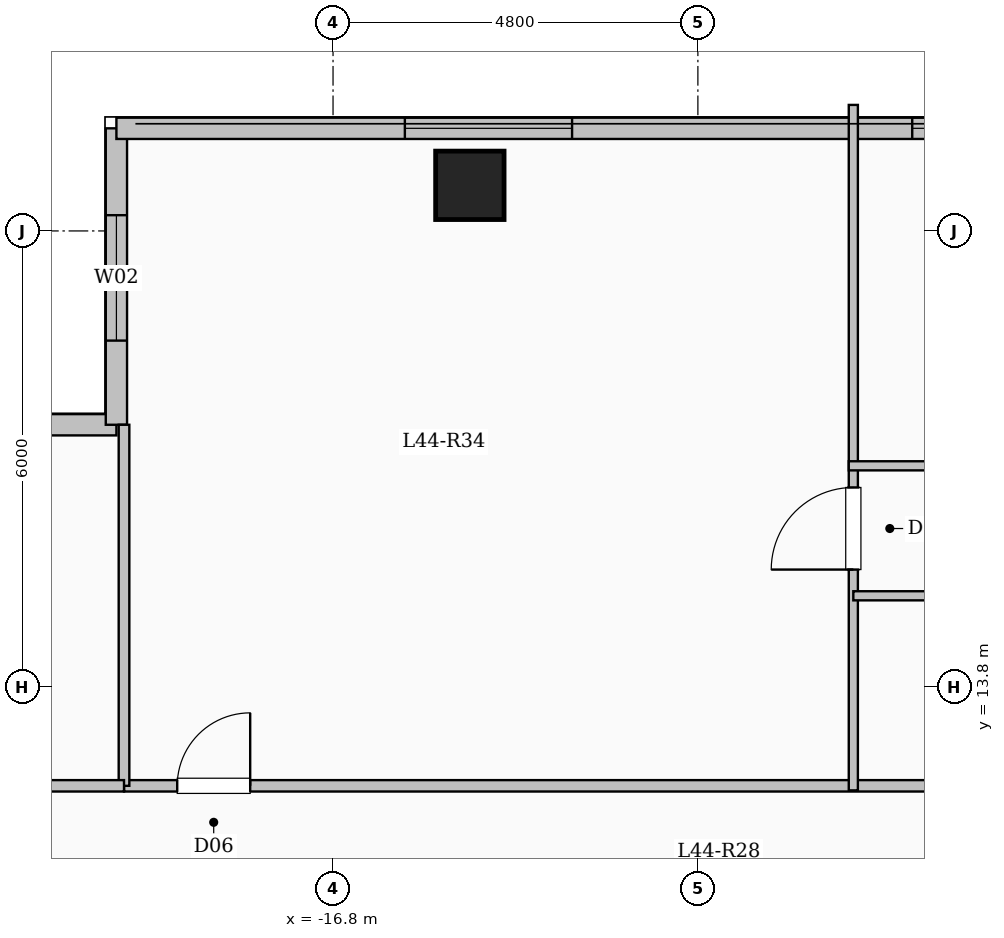
"""IFC4 building model, lengths in metres.
Left out: names, types, materials, properties, quantities, classifications, styles, units other than length and angle.
Written with IfcOpenShell. Run it as: python <this file> out.ifc"""

import sys

from ifc_helpers import new_model, si_unit, direction, frame, frame_2d, origin, origin_2d, place, context, subcontext, project, spatial, rectangle, extrude, element, fill, save


model = new_model("IFC4")
c1 = context("Model", 3, precision=1e-05, world=origin(), true_north=direction((0.0, 1.0)))
c2 = subcontext(c1, "Body", "Model", "MODEL_VIEW")
j1 = project(units=[si_unit("LENGTHUNIT", "METRE"), si_unit("PLANEANGLEUNIT", "RADIAN")], contexts=[c1])
p1 = place(None, origin())
s1 = spatial("IfcSite", under=j1, at=p1, CompositionType="ELEMENT")
p2 = place(p1, origin())
s2 = spatial("IfcBuilding", under=s1, at=p2, CompositionType="ELEMENT")
p3 = place(p2, frame((0.0, 0.0, 162.75)))
s3 = spatial("IfcBuildingStorey", under=s2, at=p3, CompositionType="ELEMENT", Elevation=162.75)
p4 = place(p3, frame((-15.0, 20.4, 0.0), z_axis=(0.0, 0.0, 1.0), x_axis=(1.0, 0.0, 0.0)))
e1 = element("IfcColumn", 1, at=p4, inside=s3, PredefinedType="COLUMN", context=c2, shape_type="SweptSolid", body=[
    extrude(rectangle(XDim=0.9, YDim=0.9, at=origin_2d()), origin(), (0.0, 0.0, 1.0), 3.35),
])
p5 = place(p3, frame((-25.05, 17.25, 0.0), z_axis=(0.0, 0.0, 1.0), x_axis=(1.0, 0.0, 0.0)))
e2 = element("IfcWall", 2, at=p5, inside=s3, PredefinedType="SOLIDWALL", context=c2, shape_type="SweptSolid", body=[
    extrude(rectangle(XDim=5.4, YDim=0.28, at=frame_2d((2.7, 0.0))), origin(), (0.0, 0.0, 1.0), 3.1),
])
p6 = place(p5, frame((1.725, 0.0, 0.9)))
e3 = element("IfcOpeningElement", 3, at=p6, cuts=e2, PredefinedType="OPENING", context=c2, shape_type="SweptSolid", body=[
    extrude(rectangle(XDim=2.0, YDim=1.7, at=frame_2d((1.0, 0.85))), frame((0.0, 0.15, 0.0), z_axis=(0.0, -1.0, 0.0), x_axis=(1.0, 0.0, 0.0)), (0.0, 0.0, 1.0), 0.3),
])
p7 = place(p3, frame((-19.65, 17.25, 0.0), z_axis=(0.0, 0.0, 1.0), x_axis=(0.0, 1.0, 0.0)))
e4 = element("IfcWall", 4, at=p7, inside=s3, PredefinedType="SOLIDWALL", context=c2, shape_type="SweptSolid", body=[
    extrude(rectangle(XDim=3.9, YDim=0.28, at=frame_2d((1.95, 0.0))), origin(), (0.0, 0.0, 1.0), 3.1),
])
p8 = place(p7, frame((1.107, 0.0, 0.9)))
e5 = element("IfcOpeningElement", 5, at=p8, cuts=e4, PredefinedType="OPENING", context=c2, shape_type="SweptSolid", body=[
    extrude(rectangle(XDim=1.65, YDim=1.6, at=frame_2d((0.825, 0.8))), frame((0.0, 0.15, 0.0), z_axis=(0.0, -1.0, 0.0), x_axis=(1.0, 0.0, 0.0)), (0.0, 0.0, 1.0), 0.3),
])
p9 = place(p3, frame((-19.65, 21.15, 0.0), z_axis=(0.0, 0.0, 1.0), x_axis=(1.0, 0.0, 0.0)))
e6 = element("IfcWall", 6, at=p9, inside=s3, PredefinedType="SOLIDWALL", context=c2, shape_type="SweptSolid", body=[
    extrude(rectangle(XDim=12.3, YDim=0.28, at=frame_2d((6.15, 0.0))), origin(), (0.0, 0.0, 1.0), 3.1),
])
p10 = place(p9, frame((3.795, 0.0, 0.9)))
e7 = element("IfcOpeningElement", 7, at=p10, cuts=e6, PredefinedType="OPENING", context=c2, shape_type="SweptSolid", body=[
    extrude(rectangle(XDim=2.2, YDim=1.75, at=frame_2d((1.1, 0.875))), frame((0.0, 0.15, 0.0), z_axis=(0.0, -1.0, 0.0), x_axis=(1.0, 0.0, 0.0)), (0.0, 0.0, 1.0), 0.3),
])
p11 = place(p9, frame((10.47, 0.0, 0.95)))
e8 = element("IfcOpeningElement", 8, at=p11, cuts=e6, PredefinedType="OPENING", context=c2, shape_type="SweptSolid", body=[
    extrude(rectangle(XDim=1.2, YDim=1.5, at=frame_2d((0.6, 0.75))), frame((0.0, 0.15, 0.0), z_axis=(0.0, -1.0, 0.0), x_axis=(1.0, 0.0, 0.0)), (0.0, 0.0, 1.0), 0.3),
])
p12 = place(p3, frame((-19.55, 12.5, 0.0), z_axis=(0.0, 0.0, 1.0), x_axis=(1.0, 0.0, 0.0)))
e9 = element("IfcWall", 9, at=p12, inside=s3, PredefinedType="PARTITIONING", context=c2, shape_type="SweptSolid", body=[
    extrude(rectangle(XDim=15.7, YDim=0.15, at=frame_2d((7.85, 0.0))), origin(), (0.0, 0.0, 1.0), 3.1),
])
p13 = place(p12, frame((0.7, 0.0, 0.0)))
e10 = element("IfcOpeningElement", 10, at=p13, cuts=e9, PredefinedType="OPENING", context=c2, shape_type="SweptSolid", body=[
    extrude(rectangle(XDim=0.96, YDim=2.15, at=frame_2d((0.48, 1.075))), frame((0.0, 0.085, 0.0), z_axis=(0.0, -1.0, 0.0), x_axis=(1.0, 0.0, 0.0)), (0.0, 0.0, 1.0), 0.17),
])
p14 = place(p3, frame((-9.955, 12.44, 0.0), z_axis=(0.0, 0.0, 1.0), x_axis=(0.0, 1.0, 0.0)))
e11 = element("IfcWall", 11, at=p14, inside=s3, PredefinedType="PARTITIONING", context=c2, shape_type="SweptSolid", body=[
    extrude(rectangle(XDim=9.018, YDim=0.12, at=frame_2d((4.509, 0.0))), origin(), (0.0, 0.0, 1.0), 3.1),
])
p15 = place(p14, frame((2.905, 0.0, 0.0)))
e12 = element("IfcOpeningElement", 12, at=p15, cuts=e11, PredefinedType="OPENING", context=c2, shape_type="SweptSolid", body=[
    extrude(rectangle(XDim=1.08, YDim=2.15, at=frame_2d((0.54, 1.075))), frame((0.0, 0.07, 0.0), z_axis=(0.0, -1.0, 0.0), x_axis=(1.0, 0.0, 0.0)), (0.0, 0.0, 1.0), 0.14),
])
p16 = place(p3, frame((-9.955, 15.0, 0.0), z_axis=(0.0, 0.0, 1.0), x_axis=(1.0, 0.0, 0.0)))
e13 = element("IfcWall", 13, at=p16, inside=s3, PredefinedType="PARTITIONING", context=c2, shape_type="SweptSolid", body=[
    extrude(rectangle(XDim=5.536, YDim=0.12, at=frame_2d((2.768, 0.0))), origin(), (0.0, 0.0, 1.0), 3.1),
])
p17 = place(p16, frame((2.328, 0.0, 0.0)))
e14 = element("IfcOpeningElement", 14, at=p17, cuts=e13, PredefinedType="OPENING", context=c2, shape_type="SweptSolid", body=[
    extrude(rectangle(XDim=0.88, YDim=2.1, at=frame_2d((0.44, 1.05))), frame((0.0, 0.07, 0.0), z_axis=(0.0, -1.0, 0.0), x_axis=(1.0, 0.0, 0.0)), (0.0, 0.0, 1.0), 0.14),
])
p18 = place(p3, frame((-10.015, 16.71, 0.0), z_axis=(0.0, 0.0, 1.0), x_axis=(1.0, 0.0, 0.0)))
e15 = element("IfcWall", 15, at=p18, inside=s3, PredefinedType="PARTITIONING", context=c2, shape_type="SweptSolid", body=[
    extrude(rectangle(XDim=10.625, YDim=0.12, at=frame_2d((5.312, 0.0))), origin(), (0.0, 0.0, 1.0), 3.1),
])
p19 = place(p18, frame((2.171, 0.0, 0.0)))
e16 = element("IfcOpeningElement", 16, at=p19, cuts=e15, PredefinedType="OPENING", context=c2, shape_type="SweptSolid", body=[
    extrude(rectangle(XDim=0.88, YDim=2.1, at=frame_2d((0.44, 1.05))), frame((0.0, 0.07, 0.0), z_axis=(0.0, -1.0, 0.0), x_axis=(1.0, 0.0, 0.0)), (0.0, 0.0, 1.0), 0.14),
])
p20 = place(p18, frame((7.394, 0.0, 0.0)))
e17 = element("IfcOpeningElement", 17, at=p20, cuts=e15, PredefinedType="OPENING", context=c2, shape_type="SweptSolid", body=[
    extrude(rectangle(XDim=0.88, YDim=2.1, at=frame_2d((0.44, 1.05))), frame((0.0, 0.07, 0.0), z_axis=(0.0, -1.0, 0.0), x_axis=(1.0, 0.0, 0.0)), (0.0, 0.0, 1.0), 0.14),
])
p21 = place(p3, frame((-19.55, 12.5, 0.0), z_axis=(0.0, 0.0, 1.0), x_axis=(0.0, 1.0, 0.0)))
e18 = element("IfcWall", 18, at=p21, inside=s3, PredefinedType="PARTITIONING", context=c2, shape_type="SweptSolid", body=[
    extrude(rectangle(XDim=4.75, YDim=0.14, at=frame_2d((2.375, 0.0))), origin(), (0.0, 0.0, 1.0), 3.1),
])
p22 = place(p3, frame((-25.08, 12.5, 0.0), z_axis=(0.0, 0.0, 1.0), x_axis=(1.0, 0.0, 0.0)))
e19 = element("IfcWall", 19, at=p22, inside=s3, PredefinedType="PARTITIONING", context=c2, shape_type="SweptSolid", body=[
    extrude(rectangle(XDim=5.53, YDim=0.15, at=frame_2d((2.765, 0.0))), origin(), (0.0, 0.0, 1.0), 3.1),
])
p23 = place(p22, frame((2.29, 0.0, 0.0)))
e20 = element("IfcOpeningElement", 20, at=p23, cuts=e19, PredefinedType="OPENING", context=c2, shape_type="SweptSolid", body=[
    extrude(rectangle(XDim=0.95, YDim=2.15, at=frame_2d((0.475, 1.075))), frame((0.0, 0.085, 0.0), z_axis=(0.0, -1.0, 0.0), x_axis=(1.0, 0.0, 0.0)), (0.0, 0.0, 1.0), 0.17),
])
p24 = place(p8, origin())
e21 = element("IfcWindow", 21, at=p24, inside=s3, PartitioningType="SINGLE_PANEL", PredefinedType="WINDOW", context=c2, shape_type="SweptSolid", body=[
    extrude(rectangle(XDim=1.65, YDim=1.6, at=frame_2d((0.825, 0.8))), frame((0.0, 0.03, 0.0), z_axis=(0.0, -1.0, 0.0), x_axis=(1.0, 0.0, 0.0)), (0.0, 0.0, 1.0), 0.06),
])
fill(e5, e21)
p25 = place(p10, origin())
e22 = element("IfcWindow", 22, at=p25, inside=s3, PartitioningType="SINGLE_PANEL", PredefinedType="WINDOW", context=c2, shape_type="SweptSolid", body=[
    extrude(rectangle(XDim=2.2, YDim=1.75, at=frame_2d((1.1, 0.875))), frame((0.0, 0.03, 0.0), z_axis=(0.0, -1.0, 0.0), x_axis=(1.0, 0.0, 0.0)), (0.0, 0.0, 1.0), 0.06),
])
fill(e7, e22)
p26 = place(p11, origin())
e23 = element("IfcWindow", 23, at=p26, inside=s3, PartitioningType="SINGLE_PANEL", PredefinedType="WINDOW", context=c2, shape_type="SweptSolid", body=[
    extrude(rectangle(XDim=1.2, YDim=1.5, at=frame_2d((0.6, 0.75))), frame((0.0, 0.03, 0.0), z_axis=(0.0, -1.0, 0.0), x_axis=(1.0, 0.0, 0.0)), (0.0, 0.0, 1.0), 0.06),
])
fill(e8, e23)
p27 = place(p13, origin())
e24 = element("IfcDoor", 24, at=p27, inside=s3, OperationType="SINGLE_SWING_RIGHT", PredefinedType="DOOR", context=c2, shape_type="SweptSolid", body=[
    extrude(rectangle(XDim=0.96, YDim=2.15, at=frame_2d((0.48, 1.075))), frame((0.0, 0.025, 0.0), z_axis=(0.0, -1.0, 0.0), x_axis=(1.0, 0.0, 0.0)), (0.0, 0.0, 1.0), 0.05),
])
fill(e10, e24)
p28 = place(p15, origin())
e25 = element("IfcDoor", 25, at=p28, inside=s3, OperationType="SINGLE_SWING_LEFT", PredefinedType="DOOR", context=c2, shape_type="SweptSolid", body=[
    extrude(rectangle(XDim=1.08, YDim=2.15, at=frame_2d((0.54, 1.075))), frame((0.0, 0.025, 0.0), z_axis=(0.0, -1.0, 0.0), x_axis=(1.0, 0.0, 0.0)), (0.0, 0.0, 1.0), 0.05),
])
fill(e12, e25)
save(model, sys.argv[1])
